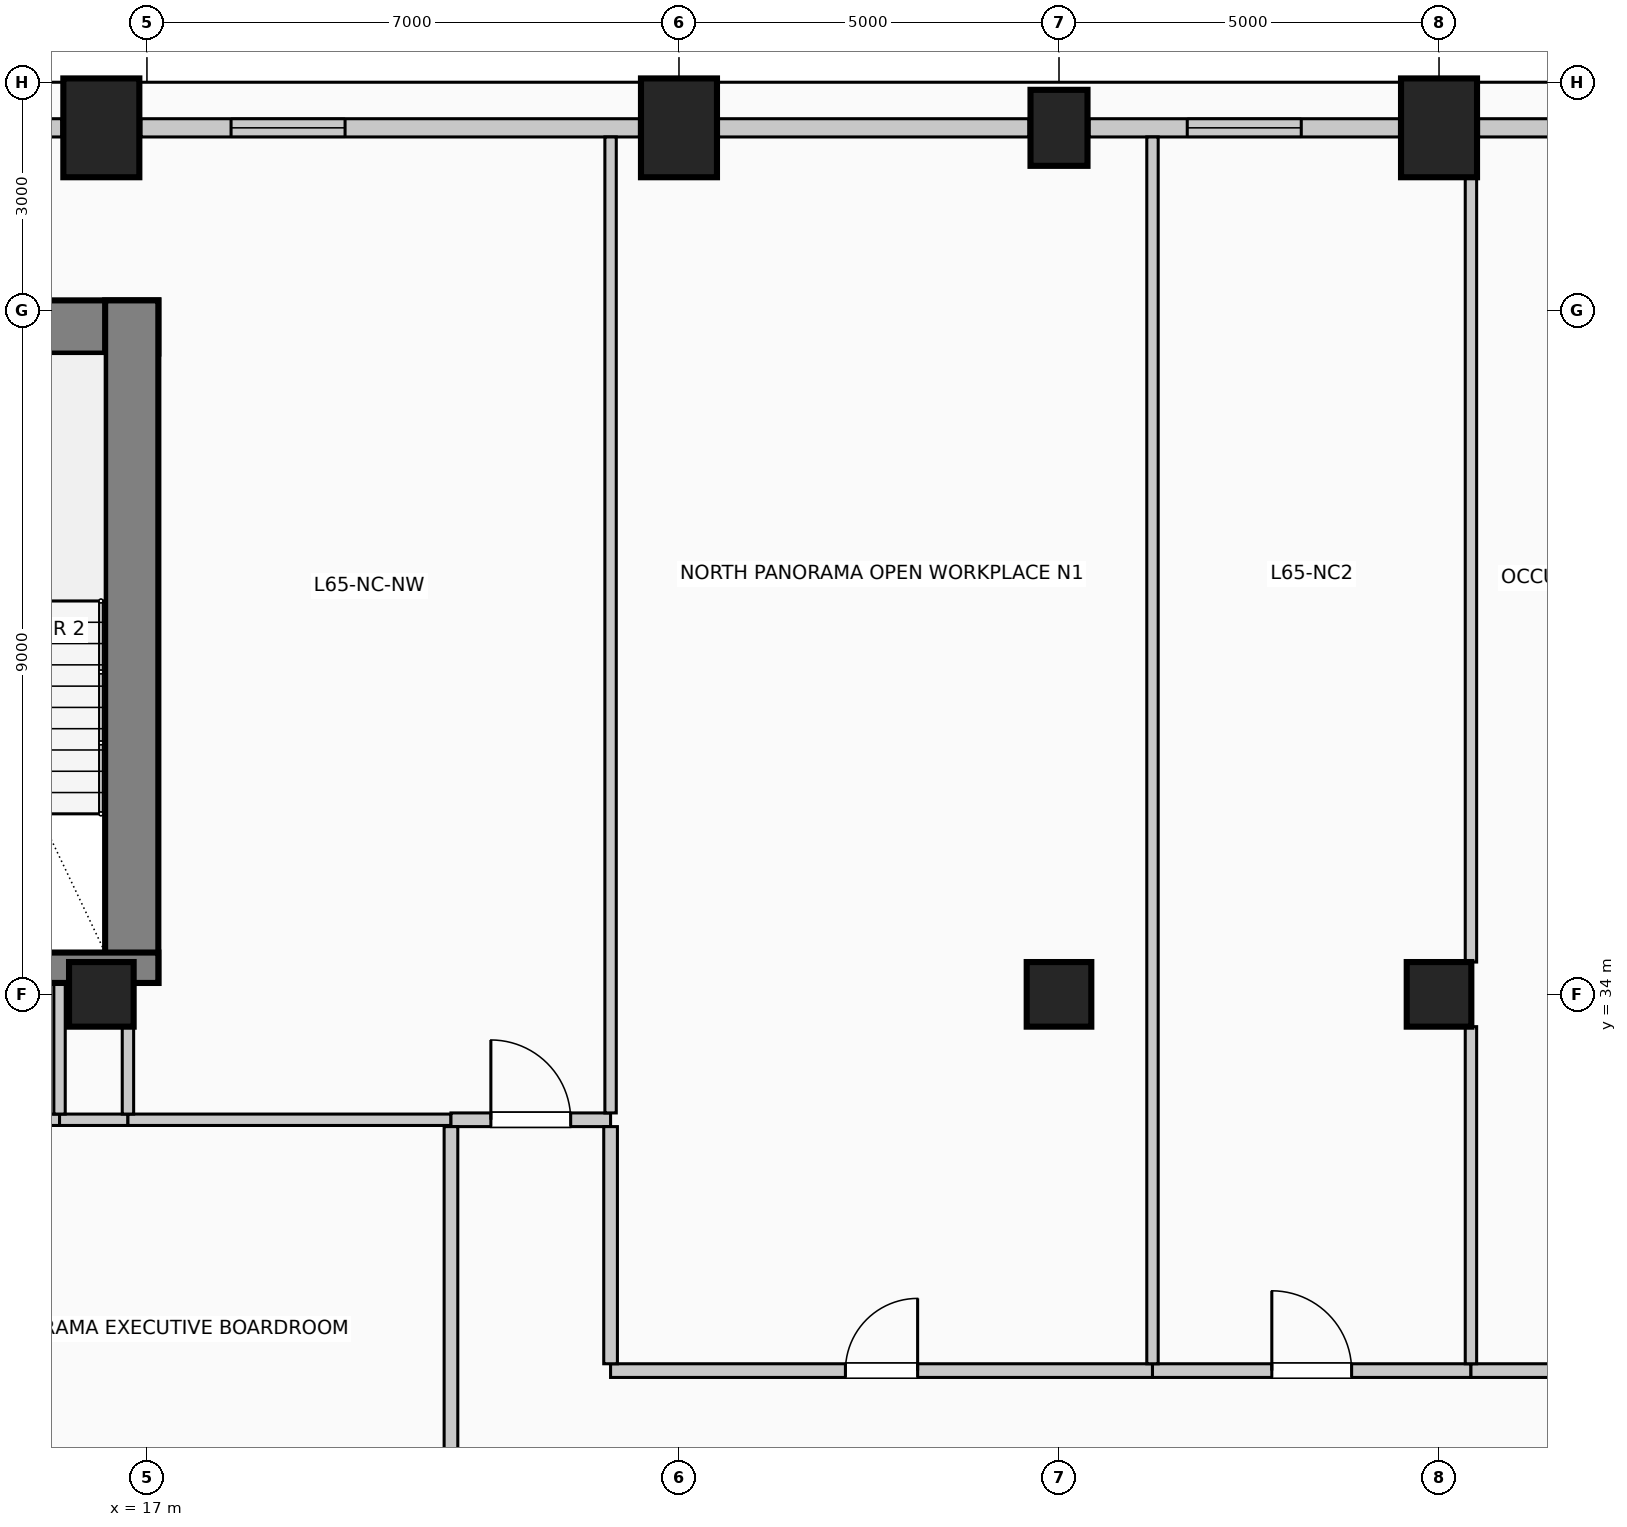
"""IFC4 building model, lengths in metres.
Left out: names, types, materials, properties, quantities, classifications, styles, units other than length and angle.
Written with IfcOpenShell. Run it as: python <this file> out.ifc"""

import sys

from ifc_helpers import new_model, si_unit, direction, frame, frame_2d, origin, origin_2d, place, context, subcontext, project, spatial, rectangle, circle, extrude, element, fill, save


model = new_model("IFC4")
c1 = context("Model", 3, precision=1e-05, world=origin(), true_north=direction((0.0, 1.0)))
c2 = subcontext(c1, "Body", "Model", "MODEL_VIEW")
j1 = project(units=[si_unit("LENGTHUNIT", "METRE"), si_unit("PLANEANGLEUNIT", "RADIAN")], contexts=[c1])
p1 = place(None, origin())
s1 = spatial("IfcSite", under=j1, at=p1, CompositionType="ELEMENT")
p2 = place(p1, origin())
s2 = spatial("IfcBuilding", under=s1, at=p2, CompositionType="ELEMENT")
p3 = place(p2, frame((0.0, 0.0, 268.6)))
s3 = spatial("IfcBuildingStorey", under=s2, at=p3, CompositionType="ELEMENT", Elevation=268.6)
p4 = place(p3, frame((2.85, 42.78, 0.0), z_axis=(0.0, 0.0, 1.0), x_axis=(1.0, 0.0, 0.0)))
e1 = element("IfcWall", 1, at=p4, inside=s3, PredefinedType="SHEAR", context=c2, shape_type="SweptSolid", body=[
    extrude(rectangle(XDim=14.3, YDim=0.7, at=frame_2d((7.15, 0.0))), origin(), (0.0, 0.0, 1.0), 4.0),
])
p5 = place(p3, frame((16.8, 34.15, 0.0), z_axis=(0.0, 0.0, 1.0), x_axis=(0.0, 1.0, 0.0)))
e2 = element("IfcWall", 2, at=p5, inside=s3, PredefinedType="SHEAR", context=c2, shape_type="SweptSolid", body=[
    extrude(rectangle(XDim=8.98, YDim=0.7, at=frame_2d((4.49, 0.0))), origin(), (0.0, 0.0, 1.0), 4.0),
])
p6 = place(p3, frame((12.29, 34.35, 0.0), z_axis=(0.0, 0.0, 1.0), x_axis=(1.0, 0.0, 0.0)))
e3 = element("IfcWall", 3, at=p6, inside=s3, PredefinedType="SHEAR", context=c2, shape_type="SweptSolid", body=[
    extrude(rectangle(XDim=4.86, YDim=0.4, at=frame_2d((2.43, 0.0))), origin(), (0.0, 0.0, 1.0), 4.0),
])
p7 = place(p6, frame((1.4, 0.0, 0.0)))
e4 = element("IfcOpeningElement", 4, at=p7, cuts=e3, PredefinedType="OPENING", context=c2, shape_type="SweptSolid", body=[
    extrude(rectangle(XDim=1.15, YDim=2.2, at=frame_2d((0.575, 1.1))), frame((0.0, 0.21, 0.0), z_axis=(0.0, -1.0, 0.0), x_axis=(1.0, 0.0, 0.0)), (0.0, 0.0, 1.0), 0.42),
])
for number, where, z_axis, x_axis in (
    (5, (16.4, 45.4, 0.0), (0.0, 0.0, 1.0), (1.0, 0.0, 0.0)),
    (6, (24.0, 45.4, 0.0), (0.0, 0.0, 1.0), (1.0, 0.0, 0.0)),
):
    element("IfcColumn", number, at=place(p3, frame(where, z_axis=z_axis, x_axis=x_axis)), inside=s3, PredefinedType="COLUMN", context=c2, shape_type="SweptSolid", body=[
        extrude(rectangle(XDim=1.0, YDim=1.3, at=origin_2d()), origin(), (0.0, 0.0, 1.0), 4.0),
    ])
p8 = place(p3, frame((29.0, 45.4, 0.0), z_axis=(0.0, 0.0, 1.0), x_axis=(1.0, 0.0, 0.0)))
e7 = element("IfcColumn", 7, at=p8, inside=s3, PredefinedType="COLUMN", context=c2, shape_type="SweptSolid", body=[
    extrude(rectangle(XDim=0.75, YDim=1.0, at=origin_2d()), origin(), (0.0, 0.0, 1.0), 4.0),
])
p9 = place(p3, frame((34.0, 45.4, 0.0), z_axis=(0.0, 0.0, 1.0), x_axis=(1.0, 0.0, 0.0)))
e8 = element("IfcColumn", 8, at=p9, inside=s3, PredefinedType="COLUMN", context=c2, shape_type="SweptSolid", body=[
    extrude(rectangle(XDim=1.0, YDim=1.3, at=origin_2d()), origin(), (0.0, 0.0, 1.0), 4.0),
])
for number, where, z_axis, x_axis in (
    (9, (16.4, 34.0, 0.0), (0.0, 0.0, 1.0), (1.0, 0.0, 0.0)),
    (10, (29.0, 34.0, 0.0), (0.0, 0.0, 1.0), (1.0, 0.0, 0.0)),
    (11, (34.0, 34.0, 0.0), (0.0, 0.0, 1.0), (1.0, 0.0, 0.0)),
):
    element("IfcColumn", number, at=place(p3, frame(where, z_axis=z_axis, x_axis=x_axis)), inside=s3, PredefinedType="COLUMN", context=c2, shape_type="SweptSolid", body=[
        extrude(circle(Radius=0.425, at=origin_2d()), origin(), (0.0, 0.0, 1.0), 4.0),
    ])
p10 = place(p3, frame((14.395, 45.4, 0.0), z_axis=(0.0, 0.0, 1.0), x_axis=(1.0, 0.0, 0.0)))
e12 = element("IfcWall", 12, at=p10, inside=s3, PredefinedType="SOLIDWALL", context=c2, shape_type="SweptSolid", body=[
    extrude(rectangle(XDim=1.485, YDim=0.24, at=frame_2d((0.742, 0.0))), origin(), (0.0, 0.0, 1.0), 3.0),
])
p11 = place(p3, frame((16.92, 45.4, 0.0), z_axis=(0.0, 0.0, 1.0), x_axis=(1.0, 0.0, 0.0)))
e13 = element("IfcWall", 13, at=p11, inside=s3, PredefinedType="SOLIDWALL", context=c2, shape_type="SweptSolid", body=[
    extrude(rectangle(XDim=6.56, YDim=0.24, at=frame_2d((3.28, 0.0))), origin(), (0.0, 0.0, 1.0), 3.0),
])
p12 = place(p11, frame((1.187, 0.0, 0.42)))
e14 = element("IfcOpeningElement", 14, at=p12, cuts=e13, PredefinedType="OPENING", context=c2, shape_type="SweptSolid", body=[
    extrude(rectangle(XDim=1.5, YDim=2.2, at=frame_2d((0.75, 1.1))), frame((0.0, 0.13, 0.0), z_axis=(0.0, -1.0, 0.0), x_axis=(1.0, 0.0, 0.0)), (0.0, 0.0, 1.0), 0.26),
])
p13 = place(p3, frame((24.52, 45.4, 0.0), z_axis=(0.0, 0.0, 1.0), x_axis=(1.0, 0.0, 0.0)))
e15 = element("IfcWall", 15, at=p13, inside=s3, PredefinedType="SOLIDWALL", context=c2, shape_type="SweptSolid", body=[
    extrude(rectangle(XDim=4.085, YDim=0.24, at=frame_2d((2.042, 0.0))), origin(), (0.0, 0.0, 1.0), 3.0),
])
p14 = place(p3, frame((29.395, 45.4, 0.0), z_axis=(0.0, 0.0, 1.0), x_axis=(1.0, 0.0, 0.0)))
e16 = element("IfcWall", 16, at=p14, inside=s3, PredefinedType="SOLIDWALL", context=c2, shape_type="SweptSolid", body=[
    extrude(rectangle(XDim=4.085, YDim=0.24, at=frame_2d((2.042, 0.0))), origin(), (0.0, 0.0, 1.0), 3.0),
])
p15 = place(p14, frame((1.292, 0.0, 0.42)))
e17 = element("IfcOpeningElement", 17, at=p15, cuts=e16, PredefinedType="OPENING", context=c2, shape_type="SweptSolid", body=[
    extrude(rectangle(XDim=1.5, YDim=2.2, at=frame_2d((0.75, 1.1))), frame((0.0, 0.13, 0.0), z_axis=(0.0, -1.0, 0.0), x_axis=(1.0, 0.0, 0.0)), (0.0, 0.0, 1.0), 0.26),
])
p16 = place(p3, frame((34.52, 45.4, 0.0), z_axis=(0.0, 0.0, 1.0), x_axis=(1.0, 0.0, 0.0)))
e18 = element("IfcWall", 18, at=p16, inside=s3, PredefinedType="SOLIDWALL", context=c2, shape_type="SweptSolid", body=[
    extrude(rectangle(XDim=6.56, YDim=0.24, at=frame_2d((3.28, 0.0))), origin(), (0.0, 0.0, 1.0), 3.0),
])
p17 = place(p16, frame((1.187, 0.0, 0.42)))
e19 = element("IfcOpeningElement", 19, at=p17, cuts=e18, PredefinedType="OPENING", context=c2, shape_type="SweptSolid", body=[
    extrude(rectangle(XDim=1.5, YDim=2.2, at=frame_2d((0.75, 1.1))), frame((0.0, 0.13, 0.0), z_axis=(0.0, -1.0, 0.0), x_axis=(1.0, 0.0, 0.0)), (0.0, 0.0, 1.0), 0.26),
])
p18 = place(p3, frame((23.1, 29.05, 0.0), z_axis=(0.0, 0.0, 1.0), x_axis=(1.0, 0.0, 0.0)))
e20 = element("IfcWall", 20, at=p18, inside=s3, PredefinedType="PARTITIONING", context=c2, shape_type="SweptSolid", body=[
    extrude(rectangle(XDim=7.13, YDim=0.18, at=frame_2d((3.565, 0.0))), origin(), (0.0, 0.0, 1.0), 3.75),
])
p19 = place(p18, frame((3.09, 0.0, 0.0)))
e21 = element("IfcOpeningElement", 21, at=p19, cuts=e20, PredefinedType="OPENING", context=c2, shape_type="SweptSolid", body=[
    extrude(rectangle(XDim=0.95, YDim=2.15, at=frame_2d((0.475, 1.075))), frame((0.0, 0.1, 0.0), z_axis=(0.0, -1.0, 0.0), x_axis=(1.0, 0.0, 0.0)), (0.0, 0.0, 1.0), 0.2),
])
p20 = place(p3, frame((30.23, 29.05, 0.0), z_axis=(0.0, 0.0, 1.0), x_axis=(1.0, 0.0, 0.0)))
e22 = element("IfcWall", 22, at=p20, inside=s3, PredefinedType="PARTITIONING", context=c2, shape_type="SweptSolid", body=[
    extrude(rectangle(XDim=4.19, YDim=0.18, at=frame_2d((2.095, 0.0))), origin(), (0.0, 0.0, 1.0), 3.75),
])
p21 = place(p20, frame((1.57, 0.0, 0.0)))
e23 = element("IfcOpeningElement", 23, at=p21, cuts=e22, PredefinedType="OPENING", context=c2, shape_type="SweptSolid", body=[
    extrude(rectangle(XDim=1.05, YDim=2.15, at=frame_2d((0.525, 1.075))), frame((0.0, 0.1, 0.0), z_axis=(0.0, -1.0, 0.0), x_axis=(1.0, 0.0, 0.0)), (0.0, 0.0, 1.0), 0.2),
])
p22 = place(p3, frame((34.42, 29.05, 0.0), z_axis=(0.0, 0.0, 1.0), x_axis=(1.0, 0.0, 0.0)))
e24 = element("IfcWall", 24, at=p22, inside=s3, PredefinedType="PARTITIONING", context=c2, shape_type="SweptSolid", body=[
    extrude(rectangle(XDim=7.13, YDim=0.18, at=frame_2d((3.565, 0.0))), origin(), (0.0, 0.0, 1.0), 3.75),
])
p23 = place(p22, frame((3.09, 0.0, 0.0)))
e25 = element("IfcOpeningElement", 25, at=p23, cuts=e24, PredefinedType="OPENING", context=c2, shape_type="SweptSolid", body=[
    extrude(rectangle(XDim=0.95, YDim=2.15, at=frame_2d((0.475, 1.075))), frame((0.0, 0.1, 0.0), z_axis=(0.0, -1.0, 0.0), x_axis=(1.0, 0.0, 0.0)), (0.0, 0.0, 1.0), 0.2),
])
p24 = place(p3, frame((12.33, 32.35, 0.0), z_axis=(0.0, 0.0, 1.0), x_axis=(1.0, 0.0, 0.0)))
e26 = element("IfcWall", 26, at=p24, inside=s3, PredefinedType="PARTITIONING", context=c2, shape_type="SweptSolid", body=[
    extrude(rectangle(XDim=3.52, YDim=0.15, at=frame_2d((1.76, 0.0))), origin(), (0.0, 0.0, 1.0), 3.75),
])
p25 = place(p24, frame((1.285, 0.0, 0.0)))
e27 = element("IfcOpeningElement", 27, at=p25, cuts=e26, PredefinedType="OPENING", context=c2, shape_type="SweptSolid", body=[
    extrude(rectangle(XDim=0.95, YDim=2.15, at=frame_2d((0.475, 1.075))), frame((0.0, 0.085, 0.0), z_axis=(0.0, -1.0, 0.0), x_axis=(1.0, 0.0, 0.0)), (0.0, 0.0, 1.0), 0.17),
])
p26 = place(p3, frame((15.85, 32.35, 0.0), z_axis=(0.0, 0.0, 1.0), x_axis=(1.0, 0.0, 0.0)))
e28 = element("IfcWall", 28, at=p26, inside=s3, PredefinedType="PARTITIONING", context=c2, shape_type="SweptSolid", body=[
    extrude(rectangle(XDim=0.9, YDim=0.15, at=frame_2d((0.45, 0.0))), origin(), (0.0, 0.0, 1.0), 3.75),
])
p27 = place(p3, frame((16.75, 32.35, 0.0), z_axis=(0.0, 0.0, 1.0), x_axis=(1.0, 0.0, 0.0)))
e29 = element("IfcWall", 29, at=p27, inside=s3, PredefinedType="PARTITIONING", context=c2, shape_type="SweptSolid", body=[
    extrude(rectangle(XDim=4.25, YDim=0.15, at=frame_2d((2.125, 0.0))), origin(), (0.0, 0.0, 1.0), 3.75),
])
p28 = place(p3, frame((21.0, 32.35, 0.0), z_axis=(0.0, 0.0, 1.0), x_axis=(1.0, 0.0, 0.0)))
e30 = element("IfcWall", 30, at=p28, inside=s3, PredefinedType="PARTITIONING", context=c2, shape_type="SweptSolid", body=[
    extrude(rectangle(XDim=2.1, YDim=0.18, at=frame_2d((1.05, 0.0))), origin(), (0.0, 0.0, 1.0), 3.75),
])
p29 = place(p28, frame((0.525, 0.0, 0.0)))
e31 = element("IfcOpeningElement", 31, at=p29, cuts=e30, PredefinedType="OPENING", context=c2, shape_type="SweptSolid", body=[
    extrude(rectangle(XDim=1.05, YDim=2.15, at=frame_2d((0.525, 1.075))), frame((0.0, 0.1, 0.0), z_axis=(0.0, -1.0, 0.0), x_axis=(1.0, 0.0, 0.0)), (0.0, 0.0, 1.0), 0.2),
])
p30 = place(p3, frame((15.85, 32.425, 0.0), z_axis=(0.0, 0.0, 1.0), x_axis=(0.0, 1.0, 0.0)))
e32 = element("IfcWall", 32, at=p30, inside=s3, PredefinedType="PARTITIONING", context=c2, shape_type="SweptSolid", body=[
    extrude(rectangle(XDim=1.725, YDim=0.15, at=frame_2d((0.862, 0.0))), origin(), (0.0, 0.0, 1.0), 3.75),
])
p31 = place(p3, frame((16.75, 32.425, 0.0), z_axis=(0.0, 0.0, 1.0), x_axis=(0.0, 1.0, 0.0)))
e33 = element("IfcWall", 33, at=p31, inside=s3, PredefinedType="PARTITIONING", context=c2, shape_type="SweptSolid", body=[
    extrude(rectangle(XDim=1.15, YDim=0.15, at=frame_2d((0.575, 0.0))), origin(), (0.0, 0.0, 1.0), 3.75),
])
p32 = place(p3, frame((21.0, 26.925, 0.0), z_axis=(0.0, 0.0, 1.0), x_axis=(0.0, 1.0, 0.0)))
e34 = element("IfcWall", 34, at=p32, inside=s3, PredefinedType="PARTITIONING", context=c2, shape_type="SweptSolid", body=[
    extrude(rectangle(XDim=5.335, YDim=0.18, at=frame_2d((2.667, 0.0))), origin(), (0.0, 0.0, 1.0), 3.75),
])
p33 = place(p3, frame((23.1, 29.14, 0.0), z_axis=(0.0, 0.0, 1.0), x_axis=(0.0, 1.0, 0.0)))
e35 = element("IfcWall", 35, at=p33, inside=s3, PredefinedType="PARTITIONING", context=c2, shape_type="SweptSolid", body=[
    extrude(rectangle(XDim=3.12, YDim=0.18, at=frame_2d((1.56, 0.0))), origin(), (0.0, 0.0, 1.0), 3.75),
])
p34 = place(p3, frame((23.1, 32.44, 0.0), z_axis=(0.0, 0.0, 1.0), x_axis=(0.0, 1.0, 0.0)))
e36 = element("IfcWall", 36, at=p34, inside=s3, PredefinedType="PARTITIONING", context=c2, shape_type="SweptSolid", body=[
    extrude(rectangle(XDim=12.84, YDim=0.15, at=frame_2d((6.42, 0.0))), origin(), (0.0, 0.0, 1.0), 3.75),
])
p35 = place(p3, frame((30.23, 29.14, 0.0), z_axis=(0.0, 0.0, 1.0), x_axis=(0.0, 1.0, 0.0)))
e37 = element("IfcWall", 37, at=p35, inside=s3, PredefinedType="PARTITIONING", context=c2, shape_type="SweptSolid", body=[
    extrude(rectangle(XDim=16.14, YDim=0.15, at=frame_2d((8.07, 0.0))), origin(), (0.0, 0.0, 1.0), 3.75),
])
p36 = place(p3, frame((34.42, 29.14, 0.0), z_axis=(0.0, 0.0, 1.0), x_axis=(0.0, 1.0, 0.0)))
e38 = element("IfcWall", 38, at=p36, inside=s3, PredefinedType="PARTITIONING", context=c2, shape_type="SweptSolid", body=[
    extrude(rectangle(XDim=4.435, YDim=0.15, at=frame_2d((2.218, 0.0))), origin(), (0.0, 0.0, 1.0), 3.75),
])
p37 = place(p3, frame((34.42, 34.425, 0.0), z_axis=(0.0, 0.0, 1.0), x_axis=(0.0, 1.0, 0.0)))
e39 = element("IfcWall", 39, at=p37, inside=s3, PredefinedType="PARTITIONING", context=c2, shape_type="SweptSolid", body=[
    extrude(rectangle(XDim=10.325, YDim=0.15, at=frame_2d((5.163, 0.0))), origin(), (0.0, 0.0, 1.0), 3.75),
])
p38 = place(p12, origin())
e40 = element("IfcWindow", 40, at=p38, inside=s3, PartitioningType="SINGLE_PANEL", PredefinedType="WINDOW", context=c2, shape_type="SweptSolid", body=[
    extrude(rectangle(XDim=1.5, YDim=2.2, at=frame_2d((0.75, 1.1))), frame((0.0, 0.03, 0.0), z_axis=(0.0, -1.0, 0.0), x_axis=(1.0, 0.0, 0.0)), (0.0, 0.0, 1.0), 0.06),
])
fill(e14, e40)
p39 = place(p15, origin())
e41 = element("IfcWindow", 41, at=p39, inside=s3, PartitioningType="SINGLE_PANEL", PredefinedType="WINDOW", context=c2, shape_type="SweptSolid", body=[
    extrude(rectangle(XDim=1.5, YDim=2.2, at=frame_2d((0.75, 1.1))), frame((0.0, 0.03, 0.0), z_axis=(0.0, -1.0, 0.0), x_axis=(1.0, 0.0, 0.0)), (0.0, 0.0, 1.0), 0.06),
])
fill(e17, e41)
p40 = place(p19, origin())
e42 = element("IfcDoor", 42, at=p40, inside=s3, OperationType="SINGLE_SWING_RIGHT", PredefinedType="DOOR", context=c2, shape_type="SweptSolid", body=[
    extrude(rectangle(XDim=0.95, YDim=2.15, at=frame_2d((0.475, 1.075))), frame((0.0, 0.025, 0.0), z_axis=(0.0, -1.0, 0.0), x_axis=(1.0, 0.0, 0.0)), (0.0, 0.0, 1.0), 0.05),
])
fill(e21, e42)
p41 = place(p21, origin())
e43 = element("IfcDoor", 43, at=p41, inside=s3, OperationType="SINGLE_SWING_LEFT", PredefinedType="DOOR", context=c2, shape_type="SweptSolid", body=[
    extrude(rectangle(XDim=1.05, YDim=2.15, at=frame_2d((0.525, 1.075))), frame((0.0, 0.025, 0.0), z_axis=(0.0, -1.0, 0.0), x_axis=(1.0, 0.0, 0.0)), (0.0, 0.0, 1.0), 0.05),
])
fill(e23, e43)
p42 = place(p29, origin())
e44 = element("IfcDoor", 44, at=p42, inside=s3, OperationType="SINGLE_SWING_LEFT", PredefinedType="DOOR", context=c2, shape_type="SweptSolid", body=[
    extrude(rectangle(XDim=1.05, YDim=2.15, at=frame_2d((0.525, 1.075))), frame((0.0, 0.025, 0.0), z_axis=(0.0, -1.0, 0.0), x_axis=(1.0, 0.0, 0.0)), (0.0, 0.0, 1.0), 0.05),
])
fill(e31, e44)
save(model, sys.argv[1])
